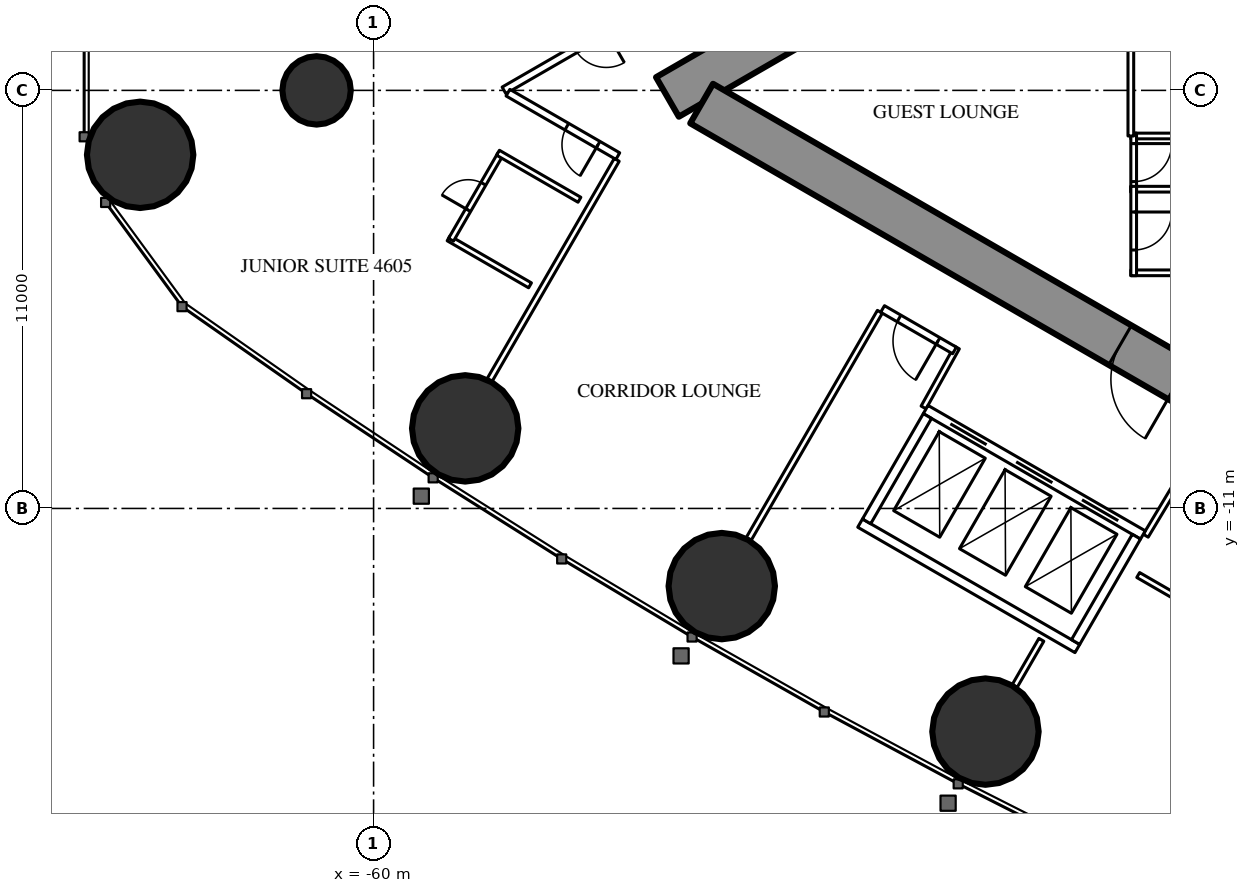
"""IFC4 building model, lengths in metres.
Left out: names, types, materials, properties, quantities, classifications, styles, units other than length and angle.
Written with IfcOpenShell. Run it as: python <this file> out.ifc"""

import sys

from ifc_helpers import new_model, si_unit, direction, frame, frame_2d, origin, origin_2d, place, context, subcontext, project, spatial, rectangle, circle, extrude, element, fill, save


model = new_model("IFC4")
c1 = context("Model", 3, precision=1e-05, world=origin(), true_north=direction((0.0, 1.0)))
c2 = subcontext(c1, "Body", "Model", "MODEL_VIEW")
j1 = project(units=[si_unit("LENGTHUNIT", "METRE"), si_unit("PLANEANGLEUNIT", "RADIAN")], contexts=[c1])
p1 = place(None, origin())
s1 = spatial("IfcSite", under=j1, at=p1, CompositionType="ELEMENT")
p2 = place(p1, origin())
s2 = spatial("IfcBuilding", under=s1, at=p2, CompositionType="ELEMENT")
p3 = place(p2, frame((0.0, 0.0, 173.8)))
s3 = spatial("IfcBuildingStorey", under=s2, at=p3, CompositionType="ELEMENT", Elevation=173.8)
for number, where, z_axis, x_axis in (
    (1, (-66.143, -1.695, 0.0), (0.0, 0.0, 1.0), (1.0, 0.0, 0.0)),
    (2, (-57.59, -8.893, 0.0), (0.0, 0.0, 1.0), (1.0, 0.0, 0.0)),
    (3, (-50.839, -13.043, 0.0), (0.0, 0.0, 1.0), (1.0, 0.0, 0.0)),
    (4, (-43.9, -16.871, 0.0), (0.0, 0.0, 1.0), (1.0, 0.0, 0.0)),
):
    element("IfcColumn", number, at=place(p3, frame(where, z_axis=z_axis, x_axis=x_axis)), inside=s3, PredefinedType="COLUMN", context=c2, shape_type="SweptSolid", body=[
        extrude(circle(Radius=1.4, at=origin_2d()), origin(), (0.0, 0.0, 1.0), 3.5),
    ])
p4 = place(p3, frame((-61.5, 0.0, 0.0), z_axis=(0.0, 0.0, 1.0), x_axis=(1.0, 0.0, 0.0)))
e5 = element("IfcColumn", 5, at=p4, inside=s3, PredefinedType="COLUMN", context=c2, shape_type="SweptSolid", body=[
    extrude(circle(Radius=0.9, at=origin_2d()), origin(), (0.0, 0.0, 1.0), 3.5),
])
p5 = place(p3, frame((-27.2, 14.3, 0.0), z_axis=(0.0, 0.0, 1.0), x_axis=(-0.866026593062, -0.499997940104, 0.0)))
e6 = element("IfcWall", 6, at=p5, inside=s3, PredefinedType="SHEAR", context=c2, shape_type="SweptSolid", body=[
    extrude(rectangle(XDim=28.946, YDim=1.2, at=frame_2d((14.473, 0.0))), origin(), (0.0, 0.0, 1.0), 3.5),
])
p6 = place(p5, frame((4.6, 0.0, 0.0)))
e7 = element("IfcOpeningElement", 7, at=p6, cuts=e6, PredefinedType="OPENING", context=c2, shape_type="SweptSolid", body=[
    extrude(rectangle(XDim=1.0, YDim=2.2, at=frame_2d((0.5, 1.1))), frame((0.0, 0.61, 0.0), z_axis=(0.0, -1.0, 0.0), x_axis=(1.0, 0.0, 0.0)), (0.0, 0.0, 1.0), 1.22),
])
p7 = place(p5, frame((13.395, 0.0, 0.0)))
e8 = element("IfcOpeningElement", 8, at=p7, cuts=e6, PredefinedType="OPENING", context=c2, shape_type="SweptSolid", body=[
    extrude(rectangle(XDim=1.8, YDim=2.2, at=frame_2d((0.9, 1.1))), frame((0.0, 0.61, 0.0), z_axis=(0.0, -1.0, 0.0), x_axis=(1.0, 0.0, 0.0)), (0.0, 0.0, 1.0), 1.22),
])
p8 = place(p3, frame((-27.2, -14.3, 0.0), z_axis=(0.0, 0.0, 1.0), x_axis=(-0.866024021859, 0.500002393557, 0.0)))
e9 = element("IfcWall", 9, at=p8, inside=s3, PredefinedType="SHEAR", context=c2, shape_type="SweptSolid", body=[
    extrude(rectangle(XDim=27.907, YDim=1.2, at=frame_2d((13.954, 0.0))), origin(), (0.0, 0.0, 1.0), 3.5),
])
p9 = place(p8, frame((4.6, 0.0, 0.0)))
e10 = element("IfcOpeningElement", 10, at=p9, cuts=e9, PredefinedType="OPENING", context=c2, shape_type="SweptSolid", body=[
    extrude(rectangle(XDim=1.0, YDim=2.2, at=frame_2d((0.5, 1.1))), frame((0.0, 0.61, 0.0), z_axis=(0.0, -1.0, 0.0), x_axis=(1.0, 0.0, 0.0)), (0.0, 0.0, 1.0), 1.22),
])
p10 = place(p8, frame((13.395, 0.0, 0.0)))
e11 = element("IfcOpeningElement", 11, at=p10, cuts=e9, PredefinedType="OPENING", context=c2, shape_type="SweptSolid", body=[
    extrude(rectangle(XDim=1.8, YDim=2.2, at=frame_2d((0.9, 1.1))), frame((0.0, 0.61, 0.0), z_axis=(0.0, -1.0, 0.0), x_axis=(1.0, 0.0, 0.0)), (0.0, 0.0, 1.0), 1.22),
])
p11 = place(p3, frame((-27.86, 16.575, 0.0), z_axis=(0.0, 0.0, 1.0), x_axis=(-0.866025533911, -0.499999774615, 0.0)))
e12 = element("IfcWall", 12, at=p11, inside=s3, PredefinedType="PARTITIONING", context=c2, shape_type="SweptSolid", body=[
    extrude(rectangle(XDim=33.149, YDim=0.2, at=frame_2d((16.575, 0.0))), origin(), (0.0, 0.0, 1.0), 3.25),
])
p12 = place(p11, frame((3.75, 0.0, 0.0)))
e13 = element("IfcOpeningElement", 13, at=p12, cuts=e12, PredefinedType="OPENING", context=c2, shape_type="SweptSolid", body=[
    extrude(rectangle(XDim=1.0, YDim=2.2, at=frame_2d((0.5, 1.1))), frame((0.0, 0.11, 0.0), z_axis=(0.0, -1.0, 0.0), x_axis=(1.0, 0.0, 0.0)), (0.0, 0.0, 1.0), 0.22),
])
p13 = place(p11, frame((20.347, 0.0, 0.0)))
e14 = element("IfcOpeningElement", 14, at=p13, cuts=e12, PredefinedType="OPENING", context=c2, shape_type="SweptSolid", body=[
    extrude(rectangle(XDim=0.95, YDim=2.2, at=frame_2d((0.475, 1.1))), frame((0.0, 0.11, 0.0), z_axis=(0.0, -1.0, 0.0), x_axis=(1.0, 0.0, 0.0)), (0.0, 0.0, 1.0), 0.22),
])
p14 = place(p11, frame((24.397, 0.0, 0.0)))
e15 = element("IfcOpeningElement", 15, at=p14, cuts=e12, PredefinedType="OPENING", context=c2, shape_type="SweptSolid", body=[
    extrude(rectangle(XDim=0.95, YDim=2.2, at=frame_2d((0.475, 1.1))), frame((0.0, 0.11, 0.0), z_axis=(0.0, -1.0, 0.0), x_axis=(1.0, 0.0, 0.0)), (0.0, 0.0, 1.0), 0.22),
])
p15 = place(p11, frame((30.042, 0.0, 0.0)))
e16 = element("IfcOpeningElement", 16, at=p15, cuts=e12, PredefinedType="OPENING", context=c2, shape_type="SweptSolid", body=[
    extrude(rectangle(XDim=0.95, YDim=2.2, at=frame_2d((0.475, 1.1))), frame((0.0, 0.11, 0.0), z_axis=(0.0, -1.0, 0.0), x_axis=(1.0, 0.0, 0.0)), (0.0, 0.0, 1.0), 0.22),
])
p16 = place(p3, frame((-46.679, -5.825, 0.0), z_axis=(0.0, 0.0, 1.0), x_axis=(-0.500006839597, -0.866021454905, 0.0)))
e17 = element("IfcWall", 17, at=p16, inside=s3, PredefinedType="PARTITIONING", context=c2, shape_type="SweptSolid", body=[
    extrude(rectangle(XDim=6.911, YDim=0.15, at=frame_2d((3.456, 0.0))), origin(), (0.0, 0.0, 1.0), 2.3),
])
p17 = place(p3, frame((-53.602, -1.828, 0.0), z_axis=(0.0, 0.0, 1.0), x_axis=(-0.49999191814, -0.866030069798, 0.0)))
e18 = element("IfcWall", 18, at=p17, inside=s3, PredefinedType="PARTITIONING", context=c2, shape_type="SweptSolid", body=[
    extrude(rectangle(XDim=6.692, YDim=0.15, at=frame_2d((3.346, 0.0))), origin(), (0.0, 0.0, 1.0), 2.3),
])
p18 = place(p3, frame((-42.429, -14.457, 0.0), z_axis=(0.0, 0.0, 1.0), x_axis=(-0.5000578829, -0.865991982497, 0.0)))
e19 = element("IfcWall", 19, at=p18, inside=s3, PredefinedType="PARTITIONING", context=c2, shape_type="SweptSolid", body=[
    extrude(rectangle(XDim=1.407, YDim=0.15, at=frame_2d((0.704, 0.0))), origin(), (0.0, 0.0, 1.0), 3.25),
])
for number, where, z_axis, x_axis in (
    (20, (-39.683, -11.718, 0.0), (0.0, 0.0, 1.0), (0.514, 0.858, 0.0)),
    (21, (-44.652, -6.764, 0.0), (0.0, 0.0, 1.0), (-0.485, -0.874, 0.0)),
):
    element("IfcWall", number, at=place(p3, frame(where, z_axis=z_axis, x_axis=x_axis)), inside=s3, PredefinedType="PARTITIONING", context=c2, shape_type="SweptSolid", body=[
        extrude(rectangle(XDim=1.805, YDim=0.15, at=frame_2d((0.903, 0.0))), origin(), (0.0, 0.0, 1.0), 3.25),
    ])
p19 = place(p3, frame((-44.715, -6.844, 0.0), z_axis=(0.0, 0.0, 1.0), x_axis=(-0.865999496279, 0.500044870432, 0.0)))
e22 = element("IfcWall", 22, at=p19, inside=s3, PredefinedType="PARTITIONING", context=c2, shape_type="SweptSolid", body=[
    extrude(rectangle(XDim=2.185, YDim=0.2, at=frame_2d((1.092, 0.0))), origin(), (0.0, 0.0, 1.0), 3.25),
])
p20 = place(p19, frame((0.5, 0.0, 0.0)))
e23 = element("IfcOpeningElement", 23, at=p20, cuts=e22, PredefinedType="OPENING", context=c2, shape_type="SweptSolid", body=[
    extrude(rectangle(XDim=1.185, YDim=2.2, at=frame_2d((0.593, 1.1))), frame((0.0, 0.11, 0.0), z_axis=(0.0, -1.0, 0.0), x_axis=(1.0, 0.0, 0.0)), (0.0, 0.0, 1.0), 0.22),
])
p21 = place(p3, frame((-53.574, -1.729, 0.0), z_axis=(0.0, 0.0, 1.0), x_axis=(-0.866019930389, 0.500009480079, 0.0)))
e24 = element("IfcWall", 24, at=p21, inside=s3, PredefinedType="PARTITIONING", context=c2, shape_type="SweptSolid", body=[
    extrude(rectangle(XDim=3.338, YDim=0.2, at=frame_2d((1.669, 0.0))), origin(), (0.0, 0.0, 1.0), 3.25),
])
p22 = place(p21, frame((0.6, 0.0, 0.0)))
e25 = element("IfcOpeningElement", 25, at=p22, cuts=e24, PredefinedType="OPENING", context=c2, shape_type="SweptSolid", body=[
    extrude(rectangle(XDim=0.95, YDim=2.2, at=frame_2d((0.475, 1.1))), frame((0.0, 0.11, 0.0), z_axis=(0.0, -1.0, 0.0), x_axis=(1.0, 0.0, 0.0)), (0.0, 0.0, 1.0), 0.22),
])
p23 = place(p3, frame((-55.884, -5.13, 0.0), z_axis=(0.0, 0.0, 1.0), x_axis=(-0.866006523861, 0.500032699561, 0.0)))
e26 = element("IfcWall", 26, at=p23, inside=s3, PredefinedType="PARTITIONING", context=c2, shape_type="SweptSolid", body=[
    extrude(rectangle(XDim=2.475, YDim=0.15, at=frame_2d((1.237, 0.0))), origin(), (0.0, 0.0, 1.0), 3.25),
])
p24 = place(p3, frame((-56.662, -1.678, 0.0), z_axis=(0.0, 0.0, 1.0), x_axis=(-0.500006934395, -0.866021400173, 0.0)))
e27 = element("IfcWall", 27, at=p24, inside=s3, PredefinedType="PARTITIONING", context=c2, shape_type="SweptSolid", body=[
    extrude(rectangle(XDim=2.6, YDim=0.15, at=frame_2d((1.3, 0.0))), origin(), (0.0, 0.0, 1.0), 3.25),
])
p25 = place(p24, frame((0.9, 0.0, 0.0)))
e28 = element("IfcOpeningElement", 28, at=p25, cuts=e27, PredefinedType="OPENING", context=c2, shape_type="SweptSolid", body=[
    extrude(rectangle(XDim=0.8, YDim=2.2, at=frame_2d((0.4, 1.1))), frame((0.0, 0.085, 0.0), z_axis=(0.0, -1.0, 0.0), x_axis=(1.0, 0.0, 0.0)), (0.0, 0.0, 1.0), 0.17),
])
for number, where, z_axis, x_axis in (
    (29, (-54.583, -2.878, 0.0), (0.0, 0.0, 1.0), (-0.866, 0.5, 0.0)),
    (30, (-37.738, -13.989, 0.0), (0.0, 0.0, 1.0), (-0.866, 0.5, 0.0)),
):
    element("IfcWall", number, at=place(p3, frame(where, z_axis=z_axis, x_axis=x_axis)), inside=s3, PredefinedType="PARTITIONING", context=c2, shape_type="SweptSolid", body=[
        extrude(rectangle(XDim=2.475, YDim=0.15, at=frame_2d((1.237, 0.0))), origin(), (0.0, 0.0, 1.0), 3.25),
    ])
for number, where, z_axis, x_axis in (
    (31, (-37.9, -1.2, 0.0), (0.0, 0.0, 1.0), (-1.0, 0.0, 0.0)),
    (32, (-37.9, -2.6, 0.0), (0.0, 0.0, 1.0), (-1.0, 0.0, 0.0)),
    (33, (-37.9, -4.8, 0.0), (0.0, 0.0, 1.0), (-1.0, 0.0, 0.0)),
):
    element("IfcWall", number, at=place(p3, frame(where, z_axis=z_axis, x_axis=x_axis)), inside=s3, PredefinedType="PARTITIONING", context=c2, shape_type="SweptSolid", body=[
        extrude(rectangle(XDim=2.175, YDim=0.15, at=frame_2d((1.087, 0.0))), origin(), (0.0, 0.0, 1.0), 3.25),
    ])
p26 = place(p3, frame((-40.0, -1.125, 0.0), z_axis=(0.0, 0.0, 1.0), x_axis=(0.0, -1.0, 0.0)))
e34 = element("IfcWall", 34, at=p26, inside=s3, PredefinedType="PARTITIONING", context=c2, shape_type="SweptSolid", body=[
    extrude(rectangle(XDim=1.55, YDim=0.15, at=frame_2d((0.775, 0.0))), origin(), (0.0, 0.0, 1.0), 3.25),
])
p27 = place(p26, frame((0.275, 0.0, 0.0)))
e35 = element("IfcOpeningElement", 35, at=p27, cuts=e34, PredefinedType="OPENING", context=c2, shape_type="SweptSolid", body=[
    extrude(rectangle(XDim=1.0, YDim=2.2, at=frame_2d((0.5, 1.1))), frame((0.0, 0.085, 0.0), z_axis=(0.0, -1.0, 0.0), x_axis=(1.0, 0.0, 0.0)), (0.0, 0.0, 1.0), 0.17),
])
p28 = place(p3, frame((-40.0, -2.525, 0.0), z_axis=(0.0, 0.0, 1.0), x_axis=(0.0, -1.0, 0.0)))
e36 = element("IfcWall", 36, at=p28, inside=s3, PredefinedType="PARTITIONING", context=c2, shape_type="SweptSolid", body=[
    extrude(rectangle(XDim=2.35, YDim=0.15, at=frame_2d((1.175, 0.0))), origin(), (0.0, 0.0, 1.0), 3.25),
])
p29 = place(p28, frame((0.675, 0.0, 0.0)))
e37 = element("IfcOpeningElement", 37, at=p29, cuts=e36, PredefinedType="OPENING", context=c2, shape_type="SweptSolid", body=[
    extrude(rectangle(XDim=1.0, YDim=2.2, at=frame_2d((0.5, 1.1))), frame((0.0, 0.085, 0.0), z_axis=(0.0, -1.0, 0.0), x_axis=(1.0, 0.0, 0.0)), (0.0, 0.0, 1.0), 0.17),
])
p30 = place(p3, frame((-40.075, 6.174, 0.0), z_axis=(0.0, 0.0, 1.0), x_axis=(0.0, -1.0, 0.0)))
e38 = element("IfcWall", 38, at=p30, inside=s3, PredefinedType="PARTITIONING", context=c2, shape_type="SweptSolid", body=[
    extrude(rectangle(XDim=7.374, YDim=0.15, at=frame_2d((3.687, 0.0))), origin(), (0.0, 0.0, 1.0), 3.25),
])
p31 = place(p30, frame((2.787, 0.0, 0.0)))
e39 = element("IfcOpeningElement", 39, at=p31, cuts=e38, PredefinedType="OPENING", context=c2, shape_type="SweptSolid", body=[
    extrude(rectangle(XDim=1.8, YDim=2.2, at=frame_2d((0.9, 1.1))), frame((0.0, 0.085, 0.0), z_axis=(0.0, -1.0, 0.0), x_axis=(1.0, 0.0, 0.0)), (0.0, 0.0, 1.0), 0.17),
])
p32 = place(p3, frame((-39.758, -11.697, 0.0), z_axis=(0.0, 0.0, 1.0), x_axis=(-0.866024194504, 0.500002094529, 0.0)))
e40 = element("IfcWall", 40, at=p32, inside=s3, PredefinedType="PARTITIONING", context=c2, shape_type="SweptSolid", body=[
    extrude(rectangle(XDim=6.6, YDim=0.25, at=frame_2d((3.3, 0.0))), origin(), (0.0, 0.0, 1.0), 3.25),
])
p33 = place(p32, frame((0.75, 0.0, 0.0)))
e41 = element("IfcOpeningElement", 41, at=p33, cuts=e40, PredefinedType="OPENING", context=c2, shape_type="SweptSolid", body=[
    extrude(rectangle(XDim=1.1, YDim=2.2, at=frame_2d((0.55, 1.1))), frame((0.0, 0.135, 0.0), z_axis=(0.0, -1.0, 0.0), x_axis=(1.0, 0.0, 0.0)), (0.0, 0.0, 1.0), 0.27),
])
p34 = place(p32, frame((2.75, 0.0, 0.0)))
e42 = element("IfcOpeningElement", 42, at=p34, cuts=e40, PredefinedType="OPENING", context=c2, shape_type="SweptSolid", body=[
    extrude(rectangle(XDim=1.1, YDim=2.2, at=frame_2d((0.55, 1.1))), frame((0.0, 0.135, 0.0), z_axis=(0.0, -1.0, 0.0), x_axis=(1.0, 0.0, 0.0)), (0.0, 0.0, 1.0), 0.27),
])
p35 = place(p32, frame((4.75, 0.0, 0.0)))
e43 = element("IfcOpeningElement", 43, at=p35, cuts=e40, PredefinedType="OPENING", context=c2, shape_type="SweptSolid", body=[
    extrude(rectangle(XDim=1.1, YDim=2.2, at=frame_2d((0.55, 1.1))), frame((0.0, 0.135, 0.0), z_axis=(0.0, -1.0, 0.0), x_axis=(1.0, 0.0, 0.0)), (0.0, 0.0, 1.0), 0.27),
])
p36 = place(p3, frame((-41.482, -14.686, 0.0), z_axis=(0.0, 0.0, 1.0), x_axis=(-0.86603344179, 0.499986077507, 0.0)))
e44 = element("IfcWall", 44, at=p36, inside=s3, PredefinedType="PARTITIONING", context=c2, shape_type="SweptSolid", body=[
    extrude(rectangle(XDim=6.6, YDim=0.25, at=frame_2d((3.3, 0.0))), origin(), (0.0, 0.0, 1.0), 3.25),
])
for number, where, z_axis, x_axis in (
    (45, (-39.928, -11.743, 0.0), (0.0, 0.0, 1.0), (-0.5, -0.866, 0.0)),
    (46, (-45.428, -8.568, 0.0), (0.0, 0.0, 1.0), (-0.5, -0.866, 0.0)),
):
    element("IfcWall", number, at=place(p3, frame(where, z_axis=z_axis, x_axis=x_axis)), inside=s3, PredefinedType="PARTITIONING", context=c2, shape_type="SweptSolid", body=[
        extrude(rectangle(XDim=3.201, YDim=0.25, at=frame_2d((1.6, 0.0))), origin(), (0.0, 0.0, 1.0), 3.25),
    ])
p37 = place(p25, origin())
e47 = element("IfcDoor", 47, at=p37, inside=s3, OperationType="SINGLE_SWING_RIGHT", PredefinedType="DOOR", context=c2, shape_type="SweptSolid", body=[
    extrude(rectangle(XDim=0.8, YDim=2.2, at=frame_2d((0.4, 1.1))), frame((0.0, 0.025, 0.0), z_axis=(0.0, -1.0, 0.0), x_axis=(1.0, 0.0, 0.0)), (0.0, 0.0, 1.0), 0.05),
])
fill(e28, e47)
p38 = place(p22, origin())
e48 = element("IfcDoor", 48, at=p38, inside=s3, OperationType="SINGLE_SWING_LEFT", PredefinedType="DOOR", context=c2, shape_type="SweptSolid", body=[
    extrude(rectangle(XDim=0.95, YDim=2.2, at=frame_2d((0.475, 1.1))), frame((0.0, 0.025, 0.0), z_axis=(0.0, -1.0, 0.0), x_axis=(1.0, 0.0, 0.0)), (0.0, 0.0, 1.0), 0.05),
])
fill(e25, e48)
p39 = place(p20, origin())
e49 = element("IfcDoor", 49, at=p39, inside=s3, OperationType="SINGLE_SWING_LEFT", PredefinedType="DOOR", context=c2, shape_type="SweptSolid", body=[
    extrude(rectangle(XDim=1.185, YDim=2.2, at=frame_2d((0.593, 1.1))), frame((0.0, 0.025, 0.0), z_axis=(0.0, -1.0, 0.0), x_axis=(1.0, 0.0, 0.0)), (0.0, 0.0, 1.0), 0.05),
])
fill(e23, e49)
p40 = place(p27, origin())
e50 = element("IfcDoor", 50, at=p40, inside=s3, OperationType="SINGLE_SWING_LEFT", PredefinedType="DOOR", context=c2, shape_type="SweptSolid", body=[
    extrude(rectangle(XDim=1.0, YDim=2.2, at=frame_2d((0.5, 1.1))), frame((0.0, 0.025, 0.0), z_axis=(0.0, -1.0, 0.0), x_axis=(1.0, 0.0, 0.0)), (0.0, 0.0, 1.0), 0.05),
])
fill(e35, e50)
p41 = place(p29, origin())
e51 = element("IfcDoor", 51, at=p41, inside=s3, OperationType="SINGLE_SWING_LEFT", PredefinedType="DOOR", context=c2, shape_type="SweptSolid", body=[
    extrude(rectangle(XDim=1.0, YDim=2.2, at=frame_2d((0.5, 1.1))), frame((0.0, 0.025, 0.0), z_axis=(0.0, -1.0, 0.0), x_axis=(1.0, 0.0, 0.0)), (0.0, 0.0, 1.0), 0.05),
])
fill(e37, e51)
p42 = place(p10, origin())
e52 = element("IfcDoor", 52, at=p42, inside=s3, OperationType="DOUBLE_DOOR_SINGLE_SWING", PredefinedType="DOOR", context=c2, shape_type="SweptSolid", body=[
    extrude(rectangle(XDim=1.8, YDim=2.2, at=frame_2d((0.9, 1.1))), frame((0.0, 0.025, 0.0), z_axis=(0.0, -1.0, 0.0), x_axis=(1.0, 0.0, 0.0)), (0.0, 0.0, 1.0), 0.05),
])
fill(e11, e52)
p43 = place(p33, origin())
e53 = element("IfcDoor", 53, at=p43, inside=s3, OperationType="DOUBLE_DOOR_SLIDING", PredefinedType="USERDEFINED", context=c2, shape_type="SweptSolid", body=[
    extrude(rectangle(XDim=1.1, YDim=2.2, at=frame_2d((0.55, 1.1))), frame((0.0, 0.025, 0.0), z_axis=(0.0, -1.0, 0.0), x_axis=(1.0, 0.0, 0.0)), (0.0, 0.0, 1.0), 0.05),
])
fill(e41, e53)
p44 = place(p34, origin())
e54 = element("IfcDoor", 54, at=p44, inside=s3, OperationType="DOUBLE_DOOR_SLIDING", PredefinedType="USERDEFINED", context=c2, shape_type="SweptSolid", body=[
    extrude(rectangle(XDim=1.1, YDim=2.2, at=frame_2d((0.55, 1.1))), frame((0.0, 0.025, 0.0), z_axis=(0.0, -1.0, 0.0), x_axis=(1.0, 0.0, 0.0)), (0.0, 0.0, 1.0), 0.05),
])
fill(e42, e54)
p45 = place(p35, origin())
e55 = element("IfcDoor", 55, at=p45, inside=s3, OperationType="DOUBLE_DOOR_SLIDING", PredefinedType="USERDEFINED", context=c2, shape_type="SweptSolid", body=[
    extrude(rectangle(XDim=1.1, YDim=2.2, at=frame_2d((0.55, 1.1))), frame((0.0, 0.025, 0.0), z_axis=(0.0, -1.0, 0.0), x_axis=(1.0, 0.0, 0.0)), (0.0, 0.0, 1.0), 0.05),
])
fill(e43, e55)
save(model, sys.argv[1])
